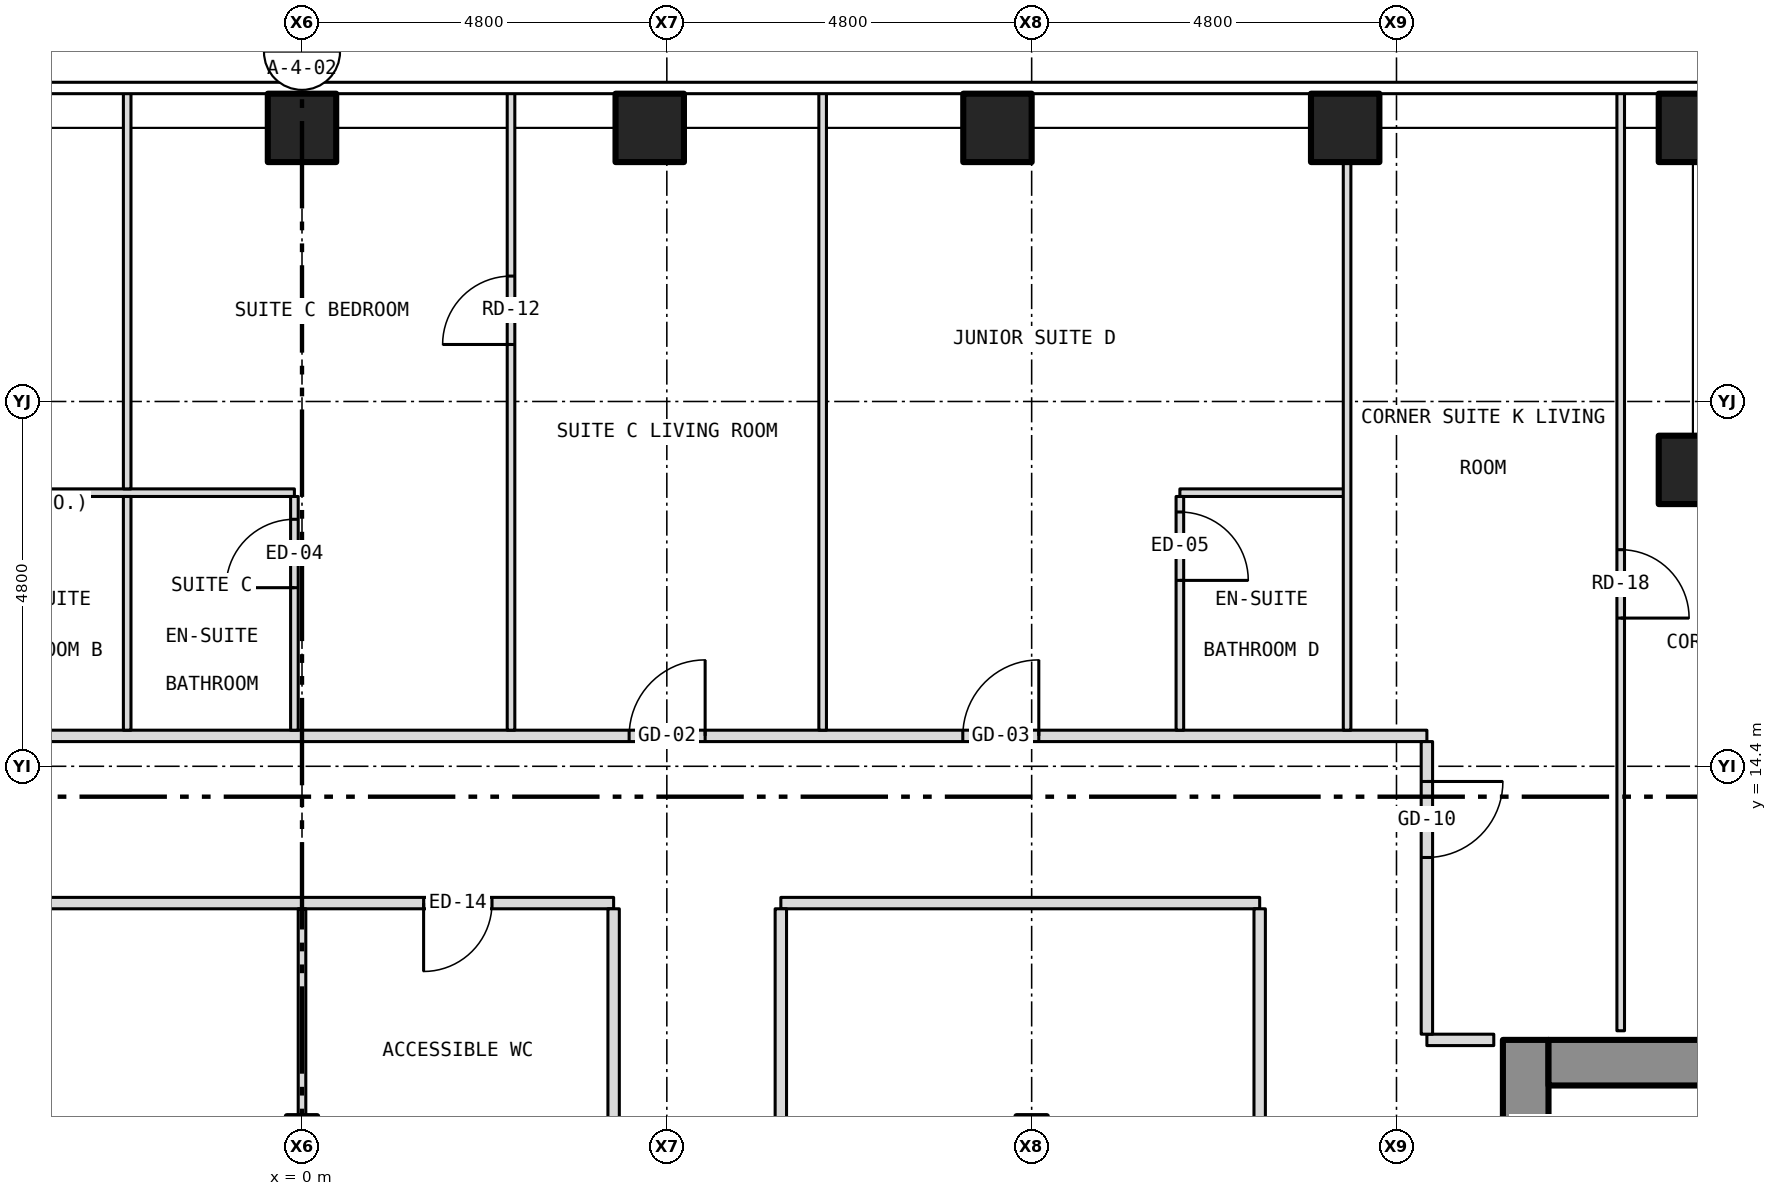
"""IFC4 building model, lengths in metres.
Left out: names, types, materials, properties, quantities, classifications, styles, units other than length and angle.
Written with IfcOpenShell. Run it as: python <this file> out.ifc"""

import sys

from ifc_helpers import new_model, si_unit, direction, frame, frame_2d, origin, origin_2d, place, context, subcontext, project, spatial, rectangle, hollow_rectangle, extrude, element, fill, save


model = new_model("IFC4")
c1 = context("Model", 3, precision=1e-05, world=origin(), true_north=direction((0.0, 1.0)))
c2 = subcontext(c1, "Body", "Model", "MODEL_VIEW")
j1 = project(units=[si_unit("LENGTHUNIT", "METRE"), si_unit("PLANEANGLEUNIT", "RADIAN")], contexts=[c1])
p1 = place(None, origin())
s1 = spatial("IfcSite", under=j1, at=p1, CompositionType="ELEMENT")
p2 = place(p1, origin())
s2 = spatial("IfcBuilding", under=s1, at=p2, CompositionType="ELEMENT")
p3 = place(p2, frame((0.0, 0.0, 106.5)))
s3 = spatial("IfcBuildingStorey", under=s2, at=p3, CompositionType="ELEMENT", Elevation=106.5)
for number, where, z_axis, x_axis in (
    (1, (0.0, 22.8, -0.15), (0.0, 0.0, 1.0), (1.0, 0.0, 0.0)),
    (2, (4.575, 22.8, -0.15), (0.0, 0.0, 1.0), (1.0, 0.0, 0.0)),
    (3, (9.15, 22.8, -0.15), (0.0, 0.0, 1.0), (1.0, 0.0, 0.0)),
    (4, (13.725, 22.8, -0.15), (0.0, 0.0, 1.0), (1.0, 0.0, 0.0)),
    (5, (18.3, 22.8, -0.15), (0.0, 0.0, 1.0), (1.0, 0.0, 0.0)),
    (6, (18.3, 18.3, -0.15), (0.0, 0.0, 1.0), (1.0, 0.0, 0.0)),
):
    element("IfcColumn", number, at=place(p3, frame(where, z_axis=z_axis, x_axis=x_axis)), inside=s3, PredefinedType="COLUMN", context=c2, shape_type="SweptSolid", body=[
        extrude(hollow_rectangle(XDim=0.9, YDim=0.9, WallThickness=0.05, at=origin_2d()), origin(), (0.0, 0.0, 1.0), 3.5),
    ])
p4 = place(p3, frame((16.1, -10.8, 0.0), z_axis=(0.0, 0.0, 1.0), x_axis=(0.0, 1.0, 0.0)))
e7 = element("IfcWall", 7, at=p4, inside=s3, PredefinedType="SHEAR", context=c2, shape_type="SweptSolid", body=[
    extrude(rectangle(XDim=21.6, YDim=0.6, at=frame_2d((10.8, 0.0))), origin(), (0.0, 0.0, 1.0), 3.25),
])
p5 = place(p4, frame((9.4, 0.0, 0.0)))
e8 = element("IfcOpeningElement", 8, at=p5, cuts=e7, PredefinedType="OPENING", context=c2, shape_type="SweptSolid", body=[
    extrude(rectangle(XDim=1.1, YDim=2.1, at=frame_2d((0.55, 1.05))), frame((0.0, 0.312, 0.0), z_axis=(0.0, -1.0, 0.0), x_axis=(1.0, 0.0, 0.0)), (0.0, 0.0, 1.0), 0.624),
])
p6 = place(p4, frame((11.5, 0.0, 0.0)))
e9 = element("IfcOpeningElement", 9, at=p6, cuts=e7, PredefinedType="OPENING", context=c2, shape_type="SweptSolid", body=[
    extrude(rectangle(XDim=1.1, YDim=2.1, at=frame_2d((0.55, 1.05))), frame((0.0, 0.312, 0.0), z_axis=(0.0, -1.0, 0.0), x_axis=(1.0, 0.0, 0.0)), (0.0, 0.0, 1.0), 0.624),
])
p7 = place(p4, frame((13.6, 0.0, 0.0)))
e10 = element("IfcOpeningElement", 10, at=p7, cuts=e7, PredefinedType="OPENING", context=c2, shape_type="SweptSolid", body=[
    extrude(rectangle(XDim=1.1, YDim=2.1, at=frame_2d((0.55, 1.05))), frame((0.0, 0.312, 0.0), z_axis=(0.0, -1.0, 0.0), x_axis=(1.0, 0.0, 0.0)), (0.0, 0.0, 1.0), 0.624),
])
p8 = place(p4, frame((15.7, 0.0, 0.0)))
e11 = element("IfcOpeningElement", 11, at=p8, cuts=e7, PredefinedType="OPENING", context=c2, shape_type="SweptSolid", body=[
    extrude(rectangle(XDim=1.1, YDim=2.1, at=frame_2d((0.55, 1.05))), frame((0.0, 0.312, 0.0), z_axis=(0.0, -1.0, 0.0), x_axis=(1.0, 0.0, 0.0)), (0.0, 0.0, 1.0), 0.624),
])
p9 = place(p4, frame((17.8, 0.0, 0.0)))
e12 = element("IfcOpeningElement", 12, at=p9, cuts=e7, PredefinedType="OPENING", context=c2, shape_type="SweptSolid", body=[
    extrude(rectangle(XDim=1.1, YDim=2.1, at=frame_2d((0.55, 1.05))), frame((0.0, 0.312, 0.0), z_axis=(0.0, -1.0, 0.0), x_axis=(1.0, 0.0, 0.0)), (0.0, 0.0, 1.0), 0.624),
])
p10 = place(p4, frame((5.642, 0.0, 0.0)))
e13 = element("IfcOpeningElement", 13, at=p10, cuts=e7, PredefinedType="OPENING", context=c2, shape_type="SweptSolid", body=[
    extrude(rectangle(XDim=1.1, YDim=2.1, at=frame_2d((0.55, 1.05))), frame((0.0, 0.312, 0.0), z_axis=(0.0, -1.0, 0.0), x_axis=(1.0, 0.0, 0.0)), (0.0, 0.0, 1.0), 0.624),
])
p11 = place(p4, frame((7.5, 0.0, 0.0)))
e14 = element("IfcOpeningElement", 14, at=p11, cuts=e7, PredefinedType="OPENING", context=c2, shape_type="SweptSolid", body=[
    extrude(rectangle(XDim=1.1, YDim=2.1, at=frame_2d((0.55, 1.05))), frame((0.0, 0.312, 0.0), z_axis=(0.0, -1.0, 0.0), x_axis=(1.0, 0.0, 0.0)), (0.0, 0.0, 1.0), 0.624),
])
p12 = place(p3, frame((16.4, 10.5, 0.0), z_axis=(0.0, 0.0, 1.0), x_axis=(1.0, 0.0, 0.0)))
e15 = element("IfcWall", 15, at=p12, inside=s3, PredefinedType="SHEAR", context=c2, shape_type="SweptSolid", body=[
    extrude(rectangle(XDim=5.8, YDim=0.6, at=frame_2d((2.9, 0.0))), origin(), (0.0, 0.0, 1.0), 3.25),
])
p13 = place(p3, frame((14.8, 10.8, 0.0), z_axis=(0.0, 0.0, 1.0), x_axis=(1.0, 0.0, 0.0)))
e16 = element("IfcWall", 16, at=p13, inside=s3, PredefinedType="PARTITIONING", context=c2, shape_type="SweptSolid", body=[
    extrude(rectangle(XDim=0.88, YDim=0.15, at=frame_2d((0.44, 0.0))), origin(), (0.0, 0.0, 1.0), 3.35),
])
p14 = place(p3, frame((-12.6, 12.6, 0.0), z_axis=(0.0, 0.0, 1.0), x_axis=(1.0, 0.0, 0.0)))
e17 = element("IfcWall", 17, at=p14, inside=s3, PredefinedType="PARTITIONING", context=c2, shape_type="SweptSolid", body=[
    extrude(rectangle(XDim=16.7, YDim=0.15, at=frame_2d((8.35, 0.0))), origin(), (0.0, 0.0, 1.0), 3.35),
])
p15 = place(p14, frame((14.2, 0.0, 0.0)))
e18 = element("IfcOpeningElement", 18, at=p15, cuts=e17, PredefinedType="OPENING", context=c2, shape_type="SweptSolid", body=[
    extrude(rectangle(XDim=0.9, YDim=2.1, at=frame_2d((0.45, 1.05))), frame((0.0, 0.087, 0.0), z_axis=(0.0, -1.0, 0.0), x_axis=(1.0, 0.0, 0.0)), (0.0, 0.0, 1.0), 0.174),
])
p16 = place(p14, frame((5.85, 0.0, 0.0)))
e19 = element("IfcOpeningElement", 19, at=p16, cuts=e17, PredefinedType="OPENING", context=c2, shape_type="SweptSolid", body=[
    extrude(rectangle(XDim=0.9, YDim=2.1, at=frame_2d((0.45, 1.05))), frame((0.0, 0.087, 0.0), z_axis=(0.0, -1.0, 0.0), x_axis=(1.0, 0.0, 0.0)), (0.0, 0.0, 1.0), 0.174),
])
p17 = place(p3, frame((6.3, 12.6, 0.0), z_axis=(0.0, 0.0, 1.0), x_axis=(1.0, 0.0, 0.0)))
e20 = element("IfcWall", 20, at=p17, inside=s3, PredefinedType="PARTITIONING", context=c2, shape_type="SweptSolid", body=[
    extrude(rectangle(XDim=6.3, YDim=0.15, at=frame_2d((3.15, 0.0))), origin(), (0.0, 0.0, 1.0), 3.35),
])
p18 = place(p3, frame((-14.8, 14.8, 0.0), z_axis=(0.0, 0.0, 1.0), x_axis=(1.0, 0.0, 0.0)))
e21 = element("IfcWall", 21, at=p18, inside=s3, PredefinedType="PARTITIONING", context=c2, shape_type="SweptSolid", body=[
    extrude(rectangle(XDim=29.6, YDim=0.15, at=frame_2d((14.8, 0.0))), origin(), (0.0, 0.0, 1.0), 3.35),
])
p19 = place(p18, frame((2.913, 0.0, 0.0)))
e22 = element("IfcOpeningElement", 22, at=p19, cuts=e21, PredefinedType="OPENING", context=c2, shape_type="SweptSolid", body=[
    extrude(rectangle(XDim=0.9, YDim=2.1, at=frame_2d((0.45, 1.05))), frame((0.0, 0.087, 0.0), z_axis=(0.0, -1.0, 0.0), x_axis=(1.0, 0.0, 0.0)), (0.0, 0.0, 1.0), 0.174),
])
p20 = place(p18, frame((7.481, 0.0, 0.0)))
e23 = element("IfcOpeningElement", 23, at=p20, cuts=e21, PredefinedType="OPENING", context=c2, shape_type="SweptSolid", body=[
    extrude(rectangle(XDim=1.0, YDim=2.1, at=frame_2d((0.5, 1.05))), frame((0.0, 0.087, 0.0), z_axis=(0.0, -1.0, 0.0), x_axis=(1.0, 0.0, 0.0)), (0.0, 0.0, 1.0), 0.174),
])
p21 = place(p18, frame((19.104, 0.0, 0.0)))
e24 = element("IfcOpeningElement", 24, at=p21, cuts=e21, PredefinedType="OPENING", context=c2, shape_type="SweptSolid", body=[
    extrude(rectangle(XDim=1.0, YDim=2.1, at=frame_2d((0.5, 1.05))), frame((0.0, 0.087, 0.0), z_axis=(0.0, -1.0, 0.0), x_axis=(1.0, 0.0, 0.0)), (0.0, 0.0, 1.0), 0.174),
])
p22 = place(p18, frame((23.494, 0.0, 0.0)))
e25 = element("IfcOpeningElement", 25, at=p22, cuts=e21, PredefinedType="OPENING", context=c2, shape_type="SweptSolid", body=[
    extrude(rectangle(XDim=1.0, YDim=2.1, at=frame_2d((0.5, 1.05))), frame((0.0, 0.087, 0.0), z_axis=(0.0, -1.0, 0.0), x_axis=(1.0, 0.0, 0.0)), (0.0, 0.0, 1.0), 0.174),
])
p23 = place(p3, frame((-4.5, 18.0, 0.0), z_axis=(0.0, 0.0, 1.0), x_axis=(1.0, 0.0, 0.0)))
e26 = element("IfcWall", 26, at=p23, inside=s3, PredefinedType="PARTITIONING", context=c2, shape_type="SweptSolid", body=[
    extrude(rectangle(XDim=4.4, YDim=0.1, at=frame_2d((2.2, 0.0))), origin(), (0.0, 0.0, 1.0), 3.35),
])
p24 = place(p3, frame((11.55, 18.0, 0.0), z_axis=(0.0, 0.0, 1.0), x_axis=(1.0, 0.0, 0.0)))
e27 = element("IfcWall", 27, at=p24, inside=s3, PredefinedType="PARTITIONING", context=c2, shape_type="SweptSolid", body=[
    extrude(rectangle(XDim=2.2, YDim=0.1, at=frame_2d((1.1, 0.0))), origin(), (0.0, 0.0, 1.0), 3.35),
])
p25 = place(p3, frame((-2.3, 14.875, 0.0), z_axis=(0.0, 0.0, 1.0), x_axis=(0.0, 1.0, 0.0)))
e28 = element("IfcWall", 28, at=p25, inside=s3, PredefinedType="PARTITIONING", context=c2, shape_type="SweptSolid", body=[
    extrude(rectangle(XDim=3.075, YDim=0.1, at=frame_2d((1.538, 0.0))), origin(), (0.0, 0.0, 1.0), 3.35),
])
p26 = place(p3, frame((-2.3, 18.05, 0.0), z_axis=(0.0, 0.0, 1.0), x_axis=(0.0, 1.0, 0.0)))
e29 = element("IfcWall", 29, at=p26, inside=s3, PredefinedType="PARTITIONING", context=c2, shape_type="SweptSolid", body=[
    extrude(rectangle(XDim=5.23, YDim=0.1, at=frame_2d((2.615, 0.0))), origin(), (0.0, 0.0, 1.0), 3.35),
])
p27 = place(p3, frame((-0.1, 14.875, 0.0), z_axis=(0.0, 0.0, 1.0), x_axis=(0.0, 1.0, 0.0)))
e30 = element("IfcWall", 30, at=p27, inside=s3, PredefinedType="PARTITIONING", context=c2, shape_type="SweptSolid", body=[
    extrude(rectangle(XDim=3.075, YDim=0.1, at=frame_2d((1.538, 0.0))), origin(), (0.0, 0.0, 1.0), 2.728),
])
p28 = place(p27, frame((1.875, 0.0, 0.0)))
e31 = element("IfcOpeningElement", 31, at=p28, cuts=e30, PredefinedType="OPENING", context=c2, shape_type="SweptSolid", body=[
    extrude(rectangle(XDim=0.9, YDim=2.1, at=frame_2d((0.45, 1.05))), frame((0.0, 0.062, 0.0), z_axis=(0.0, -1.0, 0.0), x_axis=(1.0, 0.0, 0.0)), (0.0, 0.0, 1.0), 0.124),
])
p29 = place(p3, frame((0.0, 9.799, 0.0), z_axis=(0.0, 0.0, 1.0), x_axis=(0.0, 1.0, 0.0)))
e32 = element("IfcWall", 32, at=p29, inside=s3, PredefinedType="PARTITIONING", context=c2, shape_type="SweptSolid", body=[
    extrude(rectangle(XDim=2.726, YDim=0.1, at=frame_2d((1.363, 0.0))), origin(), (0.0, 0.0, 1.0), 2.728),
])
p30 = place(p3, frame((2.75, 14.875, 0.0), z_axis=(0.0, 0.0, 1.0), x_axis=(0.0, 1.0, 0.0)))
e33 = element("IfcWall", 33, at=p30, inside=s3, PredefinedType="PARTITIONING", context=c2, shape_type="SweptSolid", body=[
    extrude(rectangle(XDim=8.405, YDim=0.1, at=frame_2d((4.203, 0.0))), origin(), (0.0, 0.0, 1.0), 3.35),
])
p31 = place(p30, frame((5.075, 0.0, 0.0)))
e34 = element("IfcOpeningElement", 34, at=p31, cuts=e33, PredefinedType="OPENING", context=c2, shape_type="SweptSolid", body=[
    extrude(rectangle(XDim=0.9, YDim=2.1, at=frame_2d((0.45, 1.05))), frame((0.0, 0.062, 0.0), z_axis=(0.0, -1.0, 0.0), x_axis=(1.0, 0.0, 0.0)), (0.0, 0.0, 1.0), 0.124),
])
p32 = place(p3, frame((4.1, 4.875, 0.0), z_axis=(0.0, 0.0, 1.0), x_axis=(0.0, 1.0, 0.0)))
e35 = element("IfcWall", 35, at=p32, inside=s3, PredefinedType="PARTITIONING", context=c2, shape_type="SweptSolid", body=[
    extrude(rectangle(XDim=7.65, YDim=0.15, at=frame_2d((3.825, 0.0))), origin(), (0.0, 0.0, 1.0), 3.35),
])
p33 = place(p3, frame((6.3, 4.875, 0.0), z_axis=(0.0, 0.0, 1.0), x_axis=(0.0, 1.0, 0.0)))
e36 = element("IfcWall", 36, at=p33, inside=s3, PredefinedType="PARTITIONING", context=c2, shape_type="SweptSolid", body=[
    extrude(rectangle(XDim=7.65, YDim=0.15, at=frame_2d((3.825, 0.0))), origin(), (0.0, 0.0, 1.0), 3.35),
])
p34 = place(p33, frame((3.375, 0.0, 0.0)))
e37 = element("IfcOpeningElement", 37, at=p34, cuts=e36, PredefinedType="OPENING", context=c2, shape_type="SweptSolid", body=[
    extrude(rectangle(XDim=0.9, YDim=2.1, at=frame_2d((0.45, 1.05))), frame((0.0, 0.087, 0.0), z_axis=(0.0, -1.0, 0.0), x_axis=(1.0, 0.0, 0.0)), (0.0, 0.0, 1.0), 0.174),
])
p35 = place(p3, frame((6.85, 14.875, 0.0), z_axis=(0.0, 0.0, 1.0), x_axis=(0.0, 1.0, 0.0)))
e38 = element("IfcWall", 38, at=p35, inside=s3, PredefinedType="PARTITIONING", context=c2, shape_type="SweptSolid", body=[
    extrude(rectangle(XDim=8.405, YDim=0.1, at=frame_2d((4.203, 0.0))), origin(), (0.0, 0.0, 1.0), 3.35),
])
p36 = place(p3, frame((11.55, 14.875, 0.0), z_axis=(0.0, 0.0, 1.0), x_axis=(0.0, 1.0, 0.0)))
e39 = element("IfcWall", 39, at=p36, inside=s3, PredefinedType="PARTITIONING", context=c2, shape_type="SweptSolid", body=[
    extrude(rectangle(XDim=3.075, YDim=0.1, at=frame_2d((1.538, 0.0))), origin(), (0.0, 0.0, 1.0), 3.35),
])
p37 = place(p36, frame((1.971, 0.0, 0.0)))
e40 = element("IfcOpeningElement", 40, at=p37, cuts=e39, PredefinedType="OPENING", context=c2, shape_type="SweptSolid", body=[
    extrude(rectangle(XDim=0.9, YDim=2.1, at=frame_2d((0.45, 1.05))), frame((0.0, 0.062, 0.0), z_axis=(0.0, -1.0, 0.0), x_axis=(1.0, 0.0, 0.0)), (0.0, 0.0, 1.0), 0.124),
])
p38 = place(p3, frame((12.6, 4.875, 0.0), z_axis=(0.0, 0.0, 1.0), x_axis=(0.0, 1.0, 0.0)))
e41 = element("IfcWall", 41, at=p38, inside=s3, PredefinedType="PARTITIONING", context=c2, shape_type="SweptSolid", body=[
    extrude(rectangle(XDim=7.65, YDim=0.15, at=frame_2d((3.825, 0.0))), origin(), (0.0, 0.0, 1.0), 3.35),
])
p39 = place(p3, frame((13.75, 14.875, 0.0), z_axis=(0.0, 0.0, 1.0), x_axis=(0.0, 1.0, 0.0)))
e42 = element("IfcWall", 42, at=p39, inside=s3, PredefinedType="PARTITIONING", context=c2, shape_type="SweptSolid", body=[
    extrude(rectangle(XDim=7.805, YDim=0.1, at=frame_2d((3.902, 0.0))), origin(), (0.0, 0.0, 1.0), 3.35),
])
p40 = place(p3, frame((14.8, 10.875, 0.0), z_axis=(0.0, 0.0, 1.0), x_axis=(0.0, 1.0, 0.0)))
e43 = element("IfcWall", 43, at=p40, inside=s3, PredefinedType="PARTITIONING", context=c2, shape_type="SweptSolid", body=[
    extrude(rectangle(XDim=3.85, YDim=0.15, at=frame_2d((1.925, 0.0))), origin(), (0.0, 0.0, 1.0), 3.35),
])
p41 = place(p40, frame((2.325, 0.0, 0.0)))
e44 = element("IfcOpeningElement", 44, at=p41, cuts=e43, PredefinedType="OPENING", context=c2, shape_type="SweptSolid", body=[
    extrude(rectangle(XDim=1.0, YDim=2.1, at=frame_2d((0.5, 1.05))), frame((0.0, 0.087, 0.0), z_axis=(0.0, -1.0, 0.0), x_axis=(1.0, 0.0, 0.0)), (0.0, 0.0, 1.0), 0.174),
])
p42 = place(p3, frame((17.35, 10.92, 0.0), z_axis=(0.0, 0.0, 1.0), x_axis=(0.0, 1.0, 0.0)))
e45 = element("IfcWall", 45, at=p42, inside=s3, PredefinedType="PARTITIONING", context=c2, shape_type="SweptSolid", body=[
    extrude(rectangle(XDim=12.36, YDim=0.1, at=frame_2d((6.18, 0.0))), origin(), (0.0, 0.0, 1.0), 3.35),
])
p43 = place(p42, frame((5.43, 0.0, 0.0)))
e46 = element("IfcOpeningElement", 46, at=p43, cuts=e45, PredefinedType="OPENING", context=c2, shape_type="SweptSolid", body=[
    extrude(rectangle(XDim=0.9, YDim=2.1, at=frame_2d((0.45, 1.05))), frame((0.0, 0.062, 0.0), z_axis=(0.0, -1.0, 0.0), x_axis=(1.0, 0.0, 0.0)), (0.0, 0.0, 1.0), 0.124),
])
p44 = place(p21, origin())
e47 = element("IfcDoor", 47, at=p44, inside=s3, OperationType="SINGLE_SWING_RIGHT", PredefinedType="DOOR", context=c2, shape_type="SweptSolid", body=[
    extrude(rectangle(XDim=1.0, YDim=2.1, at=frame_2d((0.5, 1.05))), frame((0.0, 0.025, 0.0), z_axis=(0.0, -1.0, 0.0), x_axis=(1.0, 0.0, 0.0)), (0.0, 0.0, 1.0), 0.05),
])
fill(e24, e47)
p45 = place(p31, origin())
e48 = element("IfcDoor", 48, at=p45, inside=s3, OperationType="SINGLE_SWING_LEFT", PredefinedType="DOOR", context=c2, shape_type="SweptSolid", body=[
    extrude(rectangle(XDim=0.9, YDim=2.1, at=frame_2d((0.45, 1.05))), frame((0.0, 0.025, 0.0), z_axis=(0.0, -1.0, 0.0), x_axis=(1.0, 0.0, 0.0)), (0.0, 0.0, 1.0), 0.05),
])
fill(e34, e48)
p46 = place(p28, origin())
e49 = element("IfcDoor", 49, at=p46, inside=s3, OperationType="SINGLE_SWING_LEFT", PredefinedType="DOOR", context=c2, shape_type="SweptSolid", body=[
    extrude(rectangle(XDim=0.9, YDim=2.1, at=frame_2d((0.45, 1.05))), frame((0.0, 0.025, 0.0), z_axis=(0.0, -1.0, 0.0), x_axis=(1.0, 0.0, 0.0)), (0.0, 0.0, 1.0), 0.05),
])
fill(e31, e49)
p47 = place(p22, origin())
e50 = element("IfcDoor", 50, at=p47, inside=s3, OperationType="SINGLE_SWING_RIGHT", PredefinedType="DOOR", context=c2, shape_type="SweptSolid", body=[
    extrude(rectangle(XDim=1.0, YDim=2.1, at=frame_2d((0.5, 1.05))), frame((0.0, 0.025, 0.0), z_axis=(0.0, -1.0, 0.0), x_axis=(1.0, 0.0, 0.0)), (0.0, 0.0, 1.0), 0.05),
])
fill(e25, e50)
p48 = place(p37, origin())
e51 = element("IfcDoor", 51, at=p48, inside=s3, OperationType="SINGLE_SWING_LEFT", PredefinedType="DOOR", context=c2, shape_type="SweptSolid", body=[
    extrude(rectangle(XDim=0.9, YDim=2.1, at=frame_2d((0.45, 1.05))), frame((0.0, 0.025, 0.0), z_axis=(0.0, -1.0, 0.0), x_axis=(1.0, 0.0, 0.0)), (0.0, 0.0, 1.0), 0.05),
])
fill(e40, e51)
p49 = place(p41, origin())
e52 = element("IfcDoor", 52, at=p49, inside=s3, OperationType="SINGLE_SWING_RIGHT", PredefinedType="DOOR", context=c2, shape_type="SweptSolid", body=[
    extrude(rectangle(XDim=1.0, YDim=2.1, at=frame_2d((0.5, 1.05))), frame((0.0, 0.025, 0.0), z_axis=(0.0, -1.0, 0.0), x_axis=(1.0, 0.0, 0.0)), (0.0, 0.0, 1.0), 0.05),
])
fill(e44, e52)
p50 = place(p43, origin())
e53 = element("IfcDoor", 53, at=p50, inside=s3, OperationType="SINGLE_SWING_LEFT", PredefinedType="DOOR", context=c2, shape_type="SweptSolid", body=[
    extrude(rectangle(XDim=0.9, YDim=2.1, at=frame_2d((0.45, 1.05))), frame((0.0, 0.025, 0.0), z_axis=(0.0, -1.0, 0.0), x_axis=(1.0, 0.0, 0.0)), (0.0, 0.0, 1.0), 0.05),
])
fill(e46, e53)
p51 = place(p15, origin())
e54 = element("IfcDoor", 54, at=p51, inside=s3, OperationType="SINGLE_SWING_LEFT", PredefinedType="DOOR", context=c2, shape_type="SweptSolid", body=[
    extrude(rectangle(XDim=0.9, YDim=2.1, at=frame_2d((0.45, 1.05))), frame((0.0, 0.025, 0.0), z_axis=(0.0, -1.0, 0.0), x_axis=(1.0, 0.0, 0.0)), (0.0, 0.0, 1.0), 0.05),
])
fill(e18, e54)
save(model, sys.argv[1])
